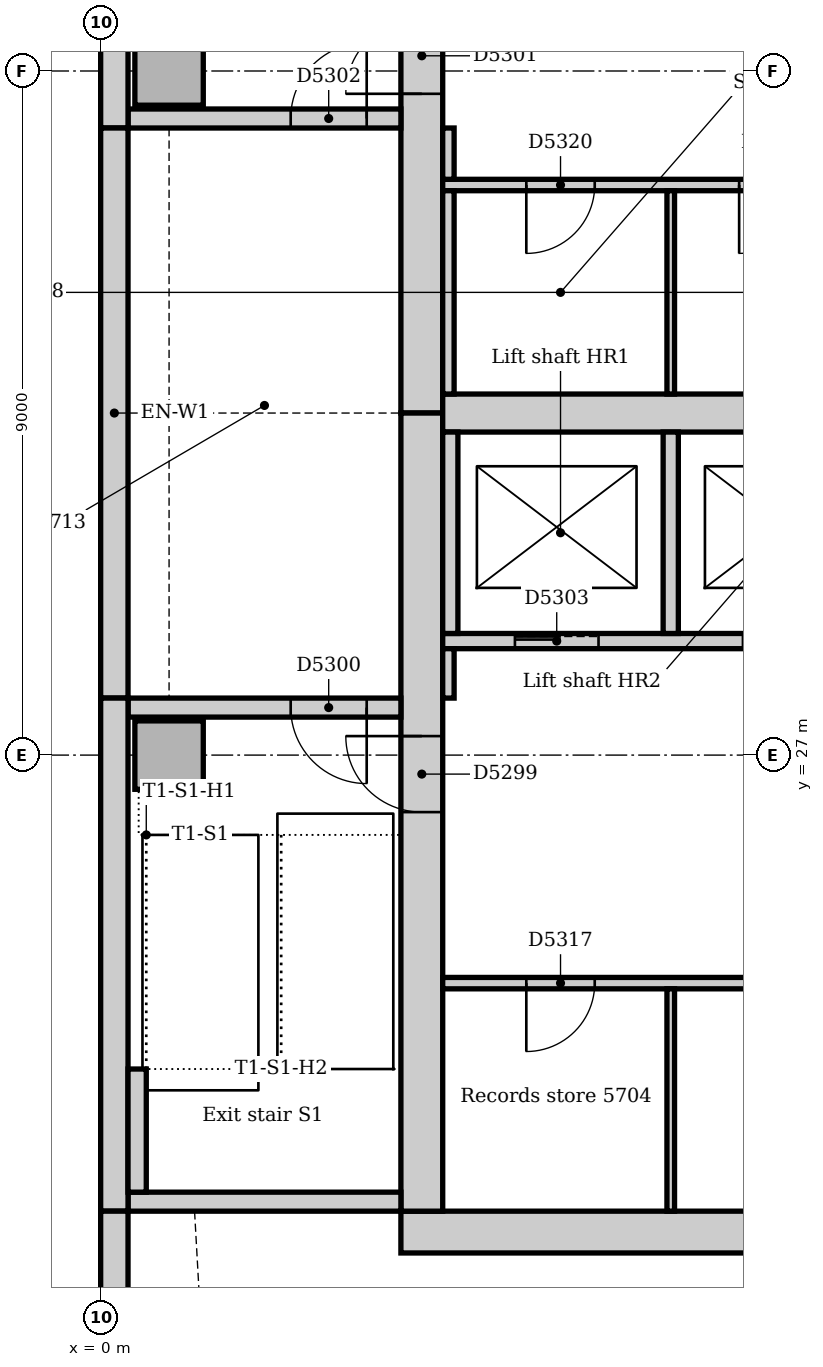
"""IFC4 building model, lengths in metres.
Left out: names, types, materials, properties, quantities, classifications, styles, units other than length and angle.
Written with IfcOpenShell. Run it as: python <this file> out.ifc"""

import sys

from ifc_helpers import new_model, si_unit, direction, frame, frame_2d, origin, origin_2d, place, context, subcontext, project, spatial, rectangle, extrude, element, fill, save


model = new_model("IFC4")
c1 = context("Model", 3, precision=1e-05, world=origin(), true_north=direction((0.0, 1.0)))
c2 = subcontext(c1, "Body", "Model", "MODEL_VIEW")
j1 = project(units=[si_unit("LENGTHUNIT", "METRE"), si_unit("PLANEANGLEUNIT", "RADIAN")], contexts=[c1])
p1 = place(None, origin())
s1 = spatial("IfcSite", under=j1, at=p1, CompositionType="ELEMENT")
p2 = place(p1, origin())
s2 = spatial("IfcBuilding", under=s1, at=p2, CompositionType="ELEMENT")
p3 = place(p2, frame((0.0, 0.0, 238.0)))
s3 = spatial("IfcBuildingStorey", under=s2, at=p3, CompositionType="ELEMENT", Elevation=238.0)
p4 = place(p3, frame((3.95, 20.725, 0.0), z_axis=(0.0, 0.0, 1.0), x_axis=(1.0, 0.0, 0.0)))
e1 = element("IfcWall", 1, at=p4, inside=s3, PredefinedType="SOLIDWALL", context=c2, shape_type="SweptSolid", body=[
    extrude(rectangle(XDim=19.1, YDim=0.55, at=frame_2d((9.55, 0.0))), origin(), (0.0, 0.0, 1.0), 4.0),
])
p5 = place(p3, frame((4.225, 42.0, 0.0), z_axis=(0.0, 0.0, 1.0), x_axis=(0.0, -1.0, 0.0)))
e2 = element("IfcWall", 2, at=p5, inside=s3, PredefinedType="SOLIDWALL", context=c2, shape_type="SweptSolid", body=[
    extrude(rectangle(XDim=10.5, YDim=0.55, at=frame_2d((5.25, 0.0))), origin(), (0.0, 0.0, 1.0), 4.0),
])
p6 = place(p5, frame((5.3, 0.0, 0.0)))
e3 = element("IfcOpeningElement", 3, at=p6, cuts=e2, PredefinedType="OPENING", context=c2, shape_type="SweptSolid", body=[
    extrude(rectangle(XDim=1.0, YDim=2.1, at=frame_2d((0.5, 1.05))), frame((0.0, 0.285, 0.0), z_axis=(0.0, -1.0, 0.0), x_axis=(1.0, 0.0, 0.0)), (0.0, 0.0, 1.0), 0.57),
])
p7 = place(p3, frame((4.225, 31.5, 0.0), z_axis=(0.0, 0.0, 1.0), x_axis=(0.0, -1.0, 0.0)))
e4 = element("IfcWall", 4, at=p7, inside=s3, PredefinedType="SOLIDWALL", context=c2, shape_type="SweptSolid", body=[
    extrude(rectangle(XDim=10.5, YDim=0.55, at=frame_2d((5.25, 0.0))), origin(), (0.0, 0.0, 1.0), 4.0),
])
p8 = place(p7, frame((4.25, 0.0, 0.0)))
e5 = element("IfcOpeningElement", 5, at=p8, cuts=e4, PredefinedType="OPENING", context=c2, shape_type="SweptSolid", body=[
    extrude(rectangle(XDim=1.0, YDim=2.1, at=frame_2d((0.5, 1.05))), frame((0.0, 0.285, 0.0), z_axis=(0.0, -1.0, 0.0), x_axis=(1.0, 0.0, 0.0)), (0.0, 0.0, 1.0), 0.57),
])
p9 = place(p3, frame((4.5, 31.5, 0.0), z_axis=(0.0, 0.0, 1.0), x_axis=(1.0, 0.0, 0.0)))
e6 = element("IfcWall", 6, at=p9, inside=s3, PredefinedType="SOLIDWALL", context=c2, shape_type="SweptSolid", body=[
    extrude(rectangle(XDim=18.0, YDim=0.5, at=frame_2d((9.0, 0.0))), origin(), (0.0, 0.0, 1.0), 4.0),
])
p10 = place(p3, frame((0.36, 21.125, 0.0), z_axis=(0.0, 0.0, 1.0), x_axis=(1.0, 0.0, 0.0)))
e7 = element("IfcWall", 7, at=p10, inside=s3, PredefinedType="SOLIDWALL", context=c2, shape_type="SweptSolid", body=[
    extrude(rectangle(XDim=3.59, YDim=0.25, at=frame_2d((1.795, 0.0))), origin(), (0.0, 0.0, 1.0), 4.0),
])
p11 = place(p3, frame((3.95, 27.625, 0.0), z_axis=(0.0, 0.0, 1.0), x_axis=(-1.0, 0.0, 0.0)))
e8 = element("IfcWall", 8, at=p11, inside=s3, PredefinedType="SOLIDWALL", context=c2, shape_type="SweptSolid", body=[
    extrude(rectangle(XDim=3.59, YDim=0.25, at=frame_2d((1.795, 0.0))), origin(), (0.0, 0.0, 1.0), 4.0),
])
p12 = place(p11, frame((0.45, 0.0, 0.0)))
e9 = element("IfcOpeningElement", 9, at=p12, cuts=e8, PredefinedType="OPENING", context=c2, shape_type="SweptSolid", body=[
    extrude(rectangle(XDim=1.0, YDim=2.1, at=frame_2d((0.5, 1.05))), frame((0.0, 0.135, 0.0), z_axis=(0.0, -1.0, 0.0), x_axis=(1.0, 0.0, 0.0)), (0.0, 0.0, 1.0), 0.27),
])
p13 = place(p3, frame((0.36, 35.375, 0.0), z_axis=(0.0, 0.0, 1.0), x_axis=(1.0, 0.0, 0.0)))
e10 = element("IfcWall", 10, at=p13, inside=s3, PredefinedType="SOLIDWALL", context=c2, shape_type="SweptSolid", body=[
    extrude(rectangle(XDim=3.59, YDim=0.25, at=frame_2d((1.795, 0.0))), origin(), (0.0, 0.0, 1.0), 4.0),
])
p14 = place(p13, frame((2.14, 0.0, 0.0)))
e11 = element("IfcOpeningElement", 11, at=p14, cuts=e10, PredefinedType="OPENING", context=c2, shape_type="SweptSolid", body=[
    extrude(rectangle(XDim=1.0, YDim=2.1, at=frame_2d((0.5, 1.05))), frame((0.0, 0.135, 0.0), z_axis=(0.0, -1.0, 0.0), x_axis=(1.0, 0.0, 0.0)), (0.0, 0.0, 1.0), 0.27),
])
for number, where, z_axis, x_axis in (
    (12, (0.9, 27.0, 0.0), (0.0, 0.0, 1.0), (1.0, 0.0, 0.0)),
    (13, (0.9, 36.0, 0.0), (0.0, 0.0, 1.0), (1.0, 0.0, 0.0)),
):
    element("IfcColumn", number, at=place(p3, frame(where, z_axis=z_axis, x_axis=x_axis)), inside=s3, PredefinedType="COLUMN", context=c2, shape_type="SweptSolid", body=[
        extrude(rectangle(XDim=0.9, YDim=0.9, at=origin_2d()), origin(), (0.0, 0.0, 1.0), 4.0),
    ])
p15 = place(p3, frame((0.18, 42.0, 0.0), z_axis=(0.0, 0.0, 1.0), x_axis=(0.0, -1.0, 0.0)))
e14 = element("IfcWall", 14, at=p15, inside=s3, PredefinedType="STANDARD", context=c2, shape_type="SweptSolid", body=[
    extrude(rectangle(XDim=6.75, YDim=0.36, at=frame_2d((3.375, 0.0))), origin(), (0.0, 0.0, 1.0), 3.7),
])
p16 = place(p3, frame((0.18, 35.25, 0.0), z_axis=(0.0, 0.0, 1.0), x_axis=(0.0, -1.0, 0.0)))
e15 = element("IfcWall", 15, at=p16, inside=s3, PredefinedType="STANDARD", context=c2, shape_type="SweptSolid", body=[
    extrude(rectangle(XDim=7.5, YDim=0.36, at=frame_2d((3.75, 0.0))), origin(), (0.0, 0.0, 1.0), 3.7),
])
p17 = place(p3, frame((0.18, 27.75, 0.0), z_axis=(0.0, 0.0, 1.0), x_axis=(0.0, -1.0, 0.0)))
e16 = element("IfcWall", 16, at=p17, inside=s3, PredefinedType="STANDARD", context=c2, shape_type="SweptSolid", body=[
    extrude(rectangle(XDim=6.75, YDim=0.36, at=frame_2d((3.375, 0.0))), origin(), (0.0, 0.0, 1.0), 3.7),
])
p18 = place(p3, frame((0.18, 21.0, 0.0), z_axis=(0.0, 0.0, 1.0), x_axis=(0.0, -1.0, 0.0)))
e17 = element("IfcWall", 17, at=p18, inside=s3, PredefinedType="STANDARD", context=c2, shape_type="SweptSolid", body=[
    extrude(rectangle(XDim=3.257, YDim=0.36, at=frame_2d((1.629, 0.0))), origin(), (0.0, 0.0, 1.0), 3.7),
])
p19 = place(p3, frame((0.48, 21.25, 0.0), z_axis=(0.0, 0.0, 1.0), x_axis=(0.0, 1.0, 0.0)))
e18 = element("IfcWall", 18, at=p19, inside=s3, PredefinedType="STANDARD", context=c2, shape_type="SweptSolid", body=[
    extrude(rectangle(XDim=1.62, YDim=0.24, at=frame_2d((0.81, 0.0))), origin(), (0.0, 0.0, 1.0), 4.0),
])
p20 = place(p3, frame((4.5, 28.5, 0.0), z_axis=(0.0, 0.0, 1.0), x_axis=(1.0, 0.0, 0.0)))
e19 = element("IfcWall", 19, at=p20, inside=s3, PredefinedType="PARTITIONING", context=c2, shape_type="SweptSolid", body=[
    extrude(rectangle(XDim=18.0, YDim=0.2, at=frame_2d((9.0, 0.0))), origin(), (0.0, 0.0, 1.0), 3.7),
])
p21 = place(p20, frame((0.95, 0.0, 0.0)))
e20 = element("IfcOpeningElement", 20, at=p21, cuts=e19, PredefinedType="OPENING", context=c2, shape_type="SweptSolid", body=[
    extrude(rectangle(XDim=1.1, YDim=2.1, at=frame_2d((0.55, 1.05))), frame((0.0, 0.11, 0.0), z_axis=(0.0, -1.0, 0.0), x_axis=(1.0, 0.0, 0.0)), (0.0, 0.0, 1.0), 0.22),
])
p22 = place(p20, frame((3.95, 0.0, 0.0)))
e21 = element("IfcOpeningElement", 21, at=p22, cuts=e19, PredefinedType="OPENING", context=c2, shape_type="SweptSolid", body=[
    extrude(rectangle(XDim=1.1, YDim=2.1, at=frame_2d((0.55, 1.05))), frame((0.0, 0.11, 0.0), z_axis=(0.0, -1.0, 0.0), x_axis=(1.0, 0.0, 0.0)), (0.0, 0.0, 1.0), 0.22),
])
p23 = place(p20, frame((6.95, 0.0, 0.0)))
e22 = element("IfcOpeningElement", 22, at=p23, cuts=e19, PredefinedType="OPENING", context=c2, shape_type="SweptSolid", body=[
    extrude(rectangle(XDim=1.1, YDim=2.1, at=frame_2d((0.55, 1.05))), frame((0.0, 0.11, 0.0), z_axis=(0.0, -1.0, 0.0), x_axis=(1.0, 0.0, 0.0)), (0.0, 0.0, 1.0), 0.22),
])
p24 = place(p20, frame((9.95, 0.0, 0.0)))
e23 = element("IfcOpeningElement", 23, at=p24, cuts=e19, PredefinedType="OPENING", context=c2, shape_type="SweptSolid", body=[
    extrude(rectangle(XDim=1.1, YDim=2.1, at=frame_2d((0.55, 1.05))), frame((0.0, 0.11, 0.0), z_axis=(0.0, -1.0, 0.0), x_axis=(1.0, 0.0, 0.0)), (0.0, 0.0, 1.0), 0.22),
])
p25 = place(p20, frame((12.95, 0.0, 0.0)))
e24 = element("IfcOpeningElement", 24, at=p25, cuts=e19, PredefinedType="OPENING", context=c2, shape_type="SweptSolid", body=[
    extrude(rectangle(XDim=1.1, YDim=2.1, at=frame_2d((0.55, 1.05))), frame((0.0, 0.11, 0.0), z_axis=(0.0, -1.0, 0.0), x_axis=(1.0, 0.0, 0.0)), (0.0, 0.0, 1.0), 0.22),
])
p26 = place(p20, frame((15.95, 0.0, 0.0)))
e25 = element("IfcOpeningElement", 25, at=p26, cuts=e19, PredefinedType="OPENING", context=c2, shape_type="SweptSolid", body=[
    extrude(rectangle(XDim=1.1, YDim=2.1, at=frame_2d((0.55, 1.05))), frame((0.0, 0.11, 0.0), z_axis=(0.0, -1.0, 0.0), x_axis=(1.0, 0.0, 0.0)), (0.0, 0.0, 1.0), 0.22),
])
for number, where, z_axis, x_axis in (
    (26, (4.6, 28.6, 0.0), (0.0, 0.0, 1.0), (0.0, 1.0, 0.0)),
    (27, (7.5, 28.6, 0.0), (0.0, 0.0, 1.0), (0.0, 1.0, 0.0)),
):
    element("IfcWall", number, at=place(p3, frame(where, z_axis=z_axis, x_axis=x_axis)), inside=s3, PredefinedType="PARTITIONING", context=c2, shape_type="SweptSolid", body=[
        extrude(rectangle(XDim=2.65, YDim=0.2, at=frame_2d((1.325, 0.0))), origin(), (0.0, 0.0, 1.0), 3.7),
    ])
p27 = place(p3, frame((4.5, 24.0, 0.0), z_axis=(0.0, 0.0, 1.0), x_axis=(1.0, 0.0, 0.0)))
e28 = element("IfcWall", 28, at=p27, inside=s3, PredefinedType="PARTITIONING", context=c2, shape_type="SweptSolid", body=[
    extrude(rectangle(XDim=18.0, YDim=0.15, at=frame_2d((9.0, 0.0))), origin(), (0.0, 0.0, 1.0), 3.7),
])
p28 = place(p27, frame((1.1, 0.0, 0.0)))
e29 = element("IfcOpeningElement", 29, at=p28, cuts=e28, PredefinedType="OPENING", context=c2, shape_type="SweptSolid", body=[
    extrude(rectangle(XDim=0.9, YDim=2.1, at=frame_2d((0.45, 1.05))), frame((0.0, 0.085, 0.0), z_axis=(0.0, -1.0, 0.0), x_axis=(1.0, 0.0, 0.0)), (0.0, 0.0, 1.0), 0.17),
])
p29 = place(p27, frame((7.05, 0.0, 0.0)))
e30 = element("IfcOpeningElement", 30, at=p29, cuts=e28, PredefinedType="OPENING", context=c2, shape_type="SweptSolid", body=[
    extrude(rectangle(XDim=0.9, YDim=2.1, at=frame_2d((0.45, 1.05))), frame((0.0, 0.085, 0.0), z_axis=(0.0, -1.0, 0.0), x_axis=(1.0, 0.0, 0.0)), (0.0, 0.0, 1.0), 0.17),
])
p30 = place(p27, frame((14.45, 0.0, 0.0)))
e31 = element("IfcOpeningElement", 31, at=p30, cuts=e28, PredefinedType="OPENING", context=c2, shape_type="SweptSolid", body=[
    extrude(rectangle(XDim=0.9, YDim=2.1, at=frame_2d((0.45, 1.05))), frame((0.0, 0.085, 0.0), z_axis=(0.0, -1.0, 0.0), x_axis=(1.0, 0.0, 0.0)), (0.0, 0.0, 1.0), 0.17),
])
p31 = place(p3, frame((4.5, 34.5, 0.0), z_axis=(0.0, 0.0, 1.0), x_axis=(1.0, 0.0, 0.0)))
e32 = element("IfcWall", 32, at=p31, inside=s3, PredefinedType="PARTITIONING", context=c2, shape_type="SweptSolid", body=[
    extrude(rectangle(XDim=5.9, YDim=0.15, at=frame_2d((2.95, 0.0))), origin(), (0.0, 0.0, 1.0), 3.7),
])
p32 = place(p31, frame((1.1, 0.0, 0.0)))
e33 = element("IfcOpeningElement", 33, at=p32, cuts=e32, PredefinedType="OPENING", context=c2, shape_type="SweptSolid", body=[
    extrude(rectangle(XDim=0.9, YDim=2.1, at=frame_2d((0.45, 1.05))), frame((0.0, 0.085, 0.0), z_axis=(0.0, -1.0, 0.0), x_axis=(1.0, 0.0, 0.0)), (0.0, 0.0, 1.0), 0.17),
])
p33 = place(p31, frame((3.9, 0.0, 0.0)))
e34 = element("IfcOpeningElement", 34, at=p33, cuts=e32, PredefinedType="OPENING", context=c2, shape_type="SweptSolid", body=[
    extrude(rectangle(XDim=0.9, YDim=2.1, at=frame_2d((0.45, 1.05))), frame((0.0, 0.085, 0.0), z_axis=(0.0, -1.0, 0.0), x_axis=(1.0, 0.0, 0.0)), (0.0, 0.0, 1.0), 0.17),
])
p34 = place(p3, frame((4.575, 34.575, 0.0), z_axis=(0.0, 0.0, 1.0), x_axis=(0.0, 1.0, 0.0)))
e35 = element("IfcWall", 35, at=p34, inside=s3, PredefinedType="PARTITIONING", context=c2, shape_type="SweptSolid", body=[
    extrude(rectangle(XDim=0.675, YDim=0.15, at=frame_2d((0.338, 0.0))), origin(), (0.0, 0.0, 1.0), 3.7),
])
p35 = place(p3, frame((4.575, 31.75, 0.0), z_axis=(0.0, 0.0, 1.0), x_axis=(0.0, 1.0, 0.0)))
e36 = element("IfcWall", 36, at=p35, inside=s3, PredefinedType="PARTITIONING", context=c2, shape_type="SweptSolid", body=[
    extrude(rectangle(XDim=2.675, YDim=0.15, at=frame_2d((1.337, 0.0))), origin(), (0.0, 0.0, 1.0), 3.7),
])
p36 = place(p3, frame((4.575, 27.75, 0.0), z_axis=(0.0, 0.0, 1.0), x_axis=(0.0, 1.0, 0.0)))
e37 = element("IfcWall", 37, at=p36, inside=s3, PredefinedType="PARTITIONING", context=c2, shape_type="SweptSolid", body=[
    extrude(rectangle(XDim=0.65, YDim=0.15, at=frame_2d((0.325, 0.0))), origin(), (0.0, 0.0, 1.0), 3.7),
])
p37 = place(p3, frame((7.5, 21.0, 0.0), z_axis=(0.0, 0.0, 1.0), x_axis=(0.0, 1.0, 0.0)))
e38 = element("IfcWall", 38, at=p37, inside=s3, PredefinedType="PARTITIONING", context=c2, shape_type="SweptSolid", body=[
    extrude(rectangle(XDim=2.925, YDim=0.1, at=frame_2d((1.462, 0.0))), origin(), (0.0, 0.0, 1.0), 3.7),
])
p38 = place(p3, frame((7.5, 31.75, 0.0), z_axis=(0.0, 0.0, 1.0), x_axis=(0.0, 1.0, 0.0)))
e39 = element("IfcWall", 39, at=p38, inside=s3, PredefinedType="PARTITIONING", context=c2, shape_type="SweptSolid", body=[
    extrude(rectangle(XDim=2.675, YDim=0.1, at=frame_2d((1.337, 0.0))), origin(), (0.0, 0.0, 1.0), 3.7),
])
p39 = place(p8, frame((1.0, 0.0, 0.0), z_axis=(0.0, 0.0, 1.0), x_axis=(-1.0, 0.0, 0.0)))
e40 = element("IfcDoor", 40, at=p39, inside=s3, OperationType="SINGLE_SWING_RIGHT", PredefinedType="DOOR", context=c2, shape_type="SweptSolid", body=[
    extrude(rectangle(XDim=1.0, YDim=2.1, at=frame_2d((0.5, 1.05))), frame((0.0, 0.025, 0.0), z_axis=(0.0, -1.0, 0.0), x_axis=(1.0, 0.0, 0.0)), (0.0, 0.0, 1.0), 0.05),
])
fill(e5, e40)
p40 = place(p12, origin())
e41 = element("IfcDoor", 41, at=p40, inside=s3, OperationType="SINGLE_SWING_LEFT", PredefinedType="DOOR", context=c2, shape_type="SweptSolid", body=[
    extrude(rectangle(XDim=1.0, YDim=2.1, at=frame_2d((0.5, 1.05))), frame((0.0, 0.025, 0.0), z_axis=(0.0, -1.0, 0.0), x_axis=(1.0, 0.0, 0.0)), (0.0, 0.0, 1.0), 0.05),
])
fill(e9, e41)
p41 = place(p6, frame((1.0, 0.0, 0.0), z_axis=(0.0, 0.0, 1.0), x_axis=(-1.0, 0.0, 0.0)))
e42 = element("IfcDoor", 42, at=p41, inside=s3, OperationType="SINGLE_SWING_LEFT", PredefinedType="DOOR", context=c2, shape_type="SweptSolid", body=[
    extrude(rectangle(XDim=1.0, YDim=2.1, at=frame_2d((0.5, 1.05))), frame((0.0, 0.025, 0.0), z_axis=(0.0, -1.0, 0.0), x_axis=(1.0, 0.0, 0.0)), (0.0, 0.0, 1.0), 0.05),
])
fill(e3, e42)
p42 = place(p14, origin())
e43 = element("IfcDoor", 43, at=p42, inside=s3, OperationType="SINGLE_SWING_RIGHT", PredefinedType="DOOR", context=c2, shape_type="SweptSolid", body=[
    extrude(rectangle(XDim=1.0, YDim=2.1, at=frame_2d((0.5, 1.05))), frame((0.0, 0.025, 0.0), z_axis=(0.0, -1.0, 0.0), x_axis=(1.0, 0.0, 0.0)), (0.0, 0.0, 1.0), 0.05),
])
fill(e11, e43)
p43 = place(p21, origin())
e44 = element("IfcDoor", 44, at=p43, inside=s3, OperationType="SLIDING_TO_LEFT", PredefinedType="DOOR", context=c2, shape_type="SweptSolid", body=[
    extrude(rectangle(XDim=1.1, YDim=2.1, at=frame_2d((0.55, 1.05))), frame((0.0, 0.025, 0.0), z_axis=(0.0, -1.0, 0.0), x_axis=(1.0, 0.0, 0.0)), (0.0, 0.0, 1.0), 0.05),
])
fill(e20, e44)
p44 = place(p28, frame((0.9, 0.0, 0.0), z_axis=(0.0, 0.0, 1.0), x_axis=(-1.0, 0.0, 0.0)))
e45 = element("IfcDoor", 45, at=p44, inside=s3, OperationType="SINGLE_SWING_RIGHT", PredefinedType="DOOR", context=c2, shape_type="SweptSolid", body=[
    extrude(rectangle(XDim=0.9, YDim=2.1, at=frame_2d((0.45, 1.05))), frame((0.0, 0.025, 0.0), z_axis=(0.0, -1.0, 0.0), x_axis=(1.0, 0.0, 0.0)), (0.0, 0.0, 1.0), 0.05),
])
fill(e29, e45)
p45 = place(p32, frame((0.9, 0.0, 0.0), z_axis=(0.0, 0.0, 1.0), x_axis=(-1.0, 0.0, 0.0)))
e46 = element("IfcDoor", 46, at=p45, inside=s3, OperationType="SINGLE_SWING_RIGHT", PredefinedType="DOOR", context=c2, shape_type="SweptSolid", body=[
    extrude(rectangle(XDim=0.9, YDim=2.1, at=frame_2d((0.45, 1.05))), frame((0.0, 0.025, 0.0), z_axis=(0.0, -1.0, 0.0), x_axis=(1.0, 0.0, 0.0)), (0.0, 0.0, 1.0), 0.05),
])
fill(e33, e46)
p46 = place(p33, frame((0.9, 0.0, 0.0), z_axis=(0.0, 0.0, 1.0), x_axis=(-1.0, 0.0, 0.0)))
e47 = element("IfcDoor", 47, at=p46, inside=s3, OperationType="SINGLE_SWING_RIGHT", PredefinedType="DOOR", context=c2, shape_type="SweptSolid", body=[
    extrude(rectangle(XDim=0.9, YDim=2.1, at=frame_2d((0.45, 1.05))), frame((0.0, 0.025, 0.0), z_axis=(0.0, -1.0, 0.0), x_axis=(1.0, 0.0, 0.0)), (0.0, 0.0, 1.0), 0.05),
])
fill(e34, e47)
save(model, sys.argv[1])
